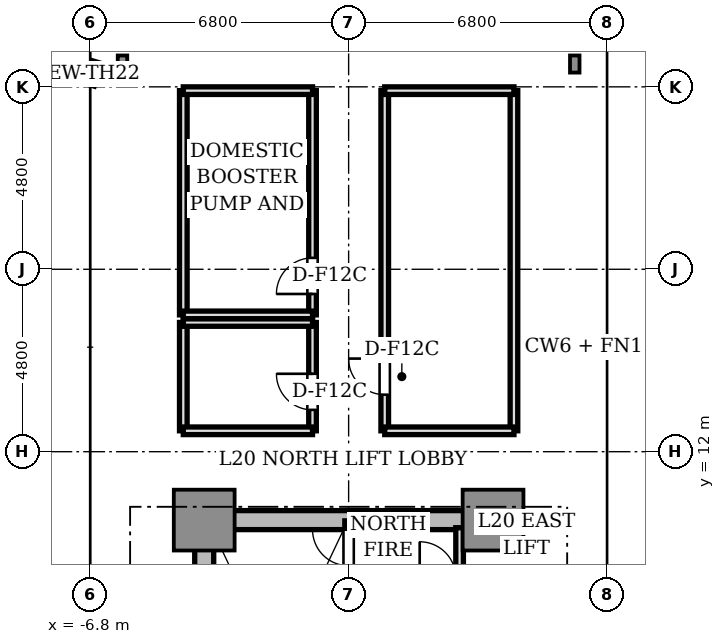
"""IFC4 building model, lengths in metres.
Left out: names, types, materials, properties, quantities, classifications, styles, units other than length and angle.
Written with IfcOpenShell. Run it as: python <this file> out.ifc"""

import sys

from ifc_helpers import new_model, si_unit, direction, frame, frame_2d, origin, origin_2d, place, context, subcontext, project, spatial, rectangle, i_section, extrude, source, transform, mapped, element, fill, save


model = new_model("IFC4")
c1 = context("Model", 3, precision=1e-05, world=origin(), true_north=direction((0.0, 1.0)))
c2 = subcontext(c1, "Body", "Model", "MODEL_VIEW")
j1 = project(units=[si_unit("LENGTHUNIT", "METRE"), si_unit("PLANEANGLEUNIT", "RADIAN")], contexts=[c1])
p1 = place(None, origin())
s1 = spatial("IfcSite", under=j1, at=p1, CompositionType="ELEMENT")
p2 = place(p1, origin())
s2 = spatial("IfcBuilding", under=s1, at=p2, CompositionType="ELEMENT")
p3 = place(p2, frame((0.0, 0.0, 74.5)))
s3 = spatial("IfcBuildingStorey", under=s2, at=p3, CompositionType="ELEMENT", Elevation=74.5)
p4 = place(p3, frame((-3.55, 10.2, 0.0), z_axis=(0.0, 0.0, 1.0), x_axis=(1.0, 0.0, 0.0)))
e1 = element("IfcWall", 1, at=p4, inside=s3, PredefinedType="SHEAR", context=c2, shape_type="SweptSolid", body=[
    extrude(rectangle(XDim=7.1, YDim=0.5, at=frame_2d((3.55, 0.0))), origin(), (0.0, 0.0, 1.0), 4.18),
])
p5 = place(p3, frame((-3.8, 2.85, 0.0), z_axis=(0.0, 0.0, 1.0), x_axis=(0.0, 1.0, 0.0)))
e2 = element("IfcWall", 2, at=p5, inside=s3, PredefinedType="SHEAR", context=c2, shape_type="SweptSolid", body=[
    extrude(rectangle(XDim=6.9, YDim=0.5, at=frame_2d((3.45, 0.0))), origin(), (0.0, 0.0, 1.0), 4.18),
])
m1 = source(origin(), c2, "Body", "SweptSolid", [
    extrude(rectangle(XDim=1.6, YDim=1.6, at=origin_2d()), origin(), (0.0, 0.0, 1.0), 4.18),
])
for number, where, z_axis, x_axis in (
    (3, (-3.8, 10.2, 0.0), (0.0, 0.0, 1.0), (1.0, 0.0, 0.0)),
    (4, (3.8, 10.2, 0.0), (0.0, 0.0, 1.0), (1.0, 0.0, 0.0)),
):
    element("IfcColumn", number, at=place(p3, frame(where, z_axis=z_axis, x_axis=x_axis)), inside=s3, PredefinedType="COLUMN", context=c2, shape_type="MappedRepresentation", body=[
        mapped(m1, transform((0.0, 0.0, 0.0), scale=1.0)),
    ])
m2 = source(origin(), c2, "Body", "SweptSolid", [
    extrude(i_section(OverallWidth=0.25, OverallDepth=0.45, WebThickness=0.014, FlangeThickness=0.014, FilletRadius=0.015, at=origin_2d()), origin(), (0.0, 0.0, 1.0), 4.18),
])
for number, where, z_axis, x_axis in (
    (5, (5.95, 22.2, 0.0), (0.0, 0.0, 1.0), (1.0, 0.0, 0.0)),
    (6, (-5.95, 22.2, 0.0), (0.0, 0.0, 1.0), (1.0, 0.0, 0.0)),
):
    element("IfcColumn", number, at=place(p3, frame(where, z_axis=z_axis, x_axis=x_axis)), inside=s3, PredefinedType="COLUMN", context=c2, shape_type="MappedRepresentation", body=[
        mapped(m2, transform((0.0, 0.0, 0.0), scale=1.0)),
    ])
p6 = place(p3, frame((-6.8, 21.65, 3.65), z_axis=(0.0, 0.0, 1.0), x_axis=(0.287204875193, 0.957869176696, 0.0)))
e7 = element("IfcWall", 7, at=p6, inside=s3, PredefinedType="STANDARD", context=c2, shape_type="SweptSolid", body=[
    extrude(rectangle(XDim=0.626, YDim=0.22, at=frame_2d((0.313, 0.0))), origin(), (0.0, 0.0, 1.0), 0.53),
])
p7 = place(p3, frame((0.0, 2.5, 0.0), z_axis=(0.0, 0.0, 1.0), x_axis=(0.0, 1.0, 0.0)))
e8 = element("IfcWall", 8, at=p7, inside=s3, PredefinedType="SOLIDWALL", context=c2, shape_type="SweptSolid", body=[
    extrude(rectangle(XDim=7.68, YDim=0.2, at=frame_2d((3.84, 0.0))), origin(), (0.0, 0.0, 1.0), 4.18),
])
p8 = place(p7, frame((6.5, 0.0, 0.0)))
e9 = element("IfcOpeningElement", 9, at=p8, cuts=e8, PredefinedType="OPENING", context=c2, shape_type="SweptSolid", body=[
    extrude(rectangle(XDim=0.95, YDim=2.15, at=frame_2d((0.475, 1.075))), frame((0.0, 0.11, 0.0), z_axis=(0.0, -1.0, 0.0), x_axis=(1.0, 0.0, 0.0)), (0.0, 0.0, 1.0), 0.22),
])
p9 = place(p3, frame((2.92, 8.68, 0.0), z_axis=(0.0, 0.0, 1.0), x_axis=(0.0, 1.0, 0.0)))
e10 = element("IfcWall", 10, at=p9, inside=s3, PredefinedType="SOLIDWALL", context=c2, shape_type="SweptSolid", body=[
    extrude(rectangle(XDim=1.32, YDim=0.2, at=frame_2d((0.66, 0.0))), origin(), (0.0, 0.0, 1.0), 3.73),
])
p10 = place(p3, frame((-0.95, 12.55, 0.0), z_axis=(0.0, 0.0, 1.0), x_axis=(0.0, 1.0, 0.0)))
e11 = element("IfcWall", 11, at=p10, inside=s3, PredefinedType="SOLIDWALL", context=c2, shape_type="SweptSolid", body=[
    extrude(rectangle(XDim=2.85, YDim=0.2, at=frame_2d((1.425, 0.0))), origin(), (0.0, 0.0, 1.0), 3.73),
])
p11 = place(p10, frame((0.55, 0.0, 0.0)))
e12 = element("IfcOpeningElement", 12, at=p11, cuts=e11, PredefinedType="OPENING", context=c2, shape_type="SweptSolid", body=[
    extrude(rectangle(XDim=0.95, YDim=2.15, at=frame_2d((0.475, 1.075))), frame((0.0, 0.11, 0.0), z_axis=(0.0, -1.0, 0.0), x_axis=(1.0, 0.0, 0.0)), (0.0, 0.0, 1.0), 0.22),
])
p12 = place(p3, frame((-4.35, 12.55, 0.0), z_axis=(0.0, 0.0, 1.0), x_axis=(0.0, 1.0, 0.0)))
e13 = element("IfcWall", 13, at=p12, inside=s3, PredefinedType="SOLIDWALL", context=c2, shape_type="SweptSolid", body=[
    extrude(rectangle(XDim=2.85, YDim=0.2, at=frame_2d((1.425, 0.0))), origin(), (0.0, 0.0, 1.0), 2.65),
])
for number, where, z_axis, x_axis in (
    (14, (-0.95, 12.55, 0.0), (0.0, 0.0, 1.0), (-1.0, 0.0, 0.0)),
    (15, (-0.95, 15.4, 0.0), (0.0, 0.0, 1.0), (-1.0, 0.0, 0.0)),
):
    element("IfcWall", number, at=place(p3, frame(where, z_axis=z_axis, x_axis=x_axis)), inside=s3, PredefinedType="SOLIDWALL", context=c2, shape_type="SweptSolid", body=[
        extrude(rectangle(XDim=3.4, YDim=0.2, at=frame_2d((1.7, 0.0))), origin(), (0.0, 0.0, 1.0), 3.73),
    ])
p13 = place(p3, frame((-0.95, 15.6, 0.0), z_axis=(0.0, 0.0, 1.0), x_axis=(0.0, 1.0, 0.0)))
e16 = element("IfcWall", 16, at=p13, inside=s3, PredefinedType="SOLIDWALL", context=c2, shape_type="SweptSolid", body=[
    extrude(rectangle(XDim=5.9, YDim=0.2, at=frame_2d((2.95, 0.0))), origin(), (0.0, 0.0, 1.0), 3.73),
])
p14 = place(p13, frame((0.55, 0.0, 0.0)))
e17 = element("IfcOpeningElement", 17, at=p14, cuts=e16, PredefinedType="OPENING", context=c2, shape_type="SweptSolid", body=[
    extrude(rectangle(XDim=0.95, YDim=2.15, at=frame_2d((0.475, 1.075))), frame((0.0, 0.11, 0.0), z_axis=(0.0, -1.0, 0.0), x_axis=(1.0, 0.0, 0.0)), (0.0, 0.0, 1.0), 0.22),
])
p15 = place(p3, frame((-4.35, 15.6, 0.0), z_axis=(0.0, 0.0, 1.0), x_axis=(0.0, 1.0, 0.0)))
e18 = element("IfcWall", 18, at=p15, inside=s3, PredefinedType="SOLIDWALL", context=c2, shape_type="SweptSolid", body=[
    extrude(rectangle(XDim=5.9, YDim=0.2, at=frame_2d((2.95, 0.0))), origin(), (0.0, 0.0, 1.0), 2.65),
])
p16 = place(p3, frame((-0.95, 15.6, 0.0), z_axis=(0.0, 0.0, 1.0), x_axis=(-1.0, 0.0, 0.0)))
e19 = element("IfcWall", 19, at=p16, inside=s3, PredefinedType="SOLIDWALL", context=c2, shape_type="SweptSolid", body=[
    extrude(rectangle(XDim=3.4, YDim=0.2, at=frame_2d((1.7, 0.0))), origin(), (0.0, 0.0, 1.0), 3.73),
])
p17 = place(p3, frame((-0.95, 21.5, 0.0), z_axis=(0.0, 0.0, 1.0), x_axis=(-1.0, 0.0, 0.0)))
e20 = element("IfcWall", 20, at=p17, inside=s3, PredefinedType="SOLIDWALL", context=c2, shape_type="SweptSolid", body=[
    extrude(rectangle(XDim=3.4, YDim=0.2, at=frame_2d((1.7, 0.0))), origin(), (0.0, 0.0, 1.0), 2.65),
])
p18 = place(p3, frame((0.95, 12.55, 0.0), z_axis=(0.0, 0.0, 1.0), x_axis=(0.0, 1.0, 0.0)))
e21 = element("IfcWall", 21, at=p18, inside=s3, PredefinedType="SOLIDWALL", context=c2, shape_type="SweptSolid", body=[
    extrude(rectangle(XDim=8.95, YDim=0.2, at=frame_2d((4.475, 0.0))), origin(), (0.0, 0.0, 1.0), 3.73),
])
p19 = place(p18, frame((0.95, 0.0, 0.0)))
e22 = element("IfcOpeningElement", 22, at=p19, cuts=e21, PredefinedType="OPENING", context=c2, shape_type="SweptSolid", body=[
    extrude(rectangle(XDim=0.95, YDim=2.15, at=frame_2d((0.475, 1.075))), frame((0.0, 0.11, 0.0), z_axis=(0.0, -1.0, 0.0), x_axis=(1.0, 0.0, 0.0)), (0.0, 0.0, 1.0), 0.22),
])
p20 = place(p3, frame((4.35, 12.55, 0.0), z_axis=(0.0, 0.0, 1.0), x_axis=(0.0, 1.0, 0.0)))
e23 = element("IfcWall", 23, at=p20, inside=s3, PredefinedType="SOLIDWALL", context=c2, shape_type="SweptSolid", body=[
    extrude(rectangle(XDim=8.95, YDim=0.2, at=frame_2d((4.475, 0.0))), origin(), (0.0, 0.0, 1.0), 2.65),
])
p21 = place(p3, frame((4.35, 12.55, 0.0), z_axis=(0.0, 0.0, 1.0), x_axis=(-1.0, 0.0, 0.0)))
e24 = element("IfcWall", 24, at=p21, inside=s3, PredefinedType="SOLIDWALL", context=c2, shape_type="SweptSolid", body=[
    extrude(rectangle(XDim=3.4, YDim=0.2, at=frame_2d((1.7, 0.0))), origin(), (0.0, 0.0, 1.0), 3.73),
])
p22 = place(p3, frame((4.35, 21.5, 0.0), z_axis=(0.0, 0.0, 1.0), x_axis=(-1.0, 0.0, 0.0)))
e25 = element("IfcWall", 25, at=p22, inside=s3, PredefinedType="SOLIDWALL", context=c2, shape_type="SweptSolid", body=[
    extrude(rectangle(XDim=3.4, YDim=0.2, at=frame_2d((1.7, 0.0))), origin(), (0.0, 0.0, 1.0), 2.65),
])
m3 = source(origin(), c2, "Body", "SweptSolid", [
    extrude(rectangle(XDim=0.95, YDim=0.05, at=origin_2d()), origin(), (0.0, 0.0, 1.0), 2.15),
])
p23 = place(p8, frame((0.475, 0.0, 0.0)))
e26 = element("IfcDoor", 26, at=p23, inside=s3, OperationType="SINGLE_SWING_RIGHT", PredefinedType="DOOR", context=c2, shape_type="MappedRepresentation", body=[
    mapped(m3, transform((0.0, 0.0, 0.0), scale=1.0)),
])
fill(e9, e26)
p24 = place(p11, frame((0.475, 0.0, 0.0)))
e27 = element("IfcDoor", 27, at=p24, inside=s3, OperationType="SINGLE_SWING_RIGHT", PredefinedType="DOOR", context=c2, shape_type="MappedRepresentation", body=[
    mapped(m3, transform((0.0, 0.0, 0.0), scale=1.0)),
])
fill(e12, e27)
p25 = place(p14, frame((0.475, 0.0, 0.0)))
e28 = element("IfcDoor", 28, at=p25, inside=s3, OperationType="SINGLE_SWING_LEFT", PredefinedType="DOOR", context=c2, shape_type="MappedRepresentation", body=[
    mapped(m3, transform((0.0, 0.0, 0.0), scale=1.0)),
])
fill(e17, e28)
p26 = place(p19, frame((0.475, 0.0, 0.0)))
e29 = element("IfcDoor", 29, at=p26, inside=s3, OperationType="SINGLE_SWING_RIGHT", PredefinedType="DOOR", context=c2, shape_type="MappedRepresentation", body=[
    mapped(m3, transform((0.0, 0.0, 0.0), scale=1.0)),
])
fill(e22, e29)
save(model, sys.argv[1])
